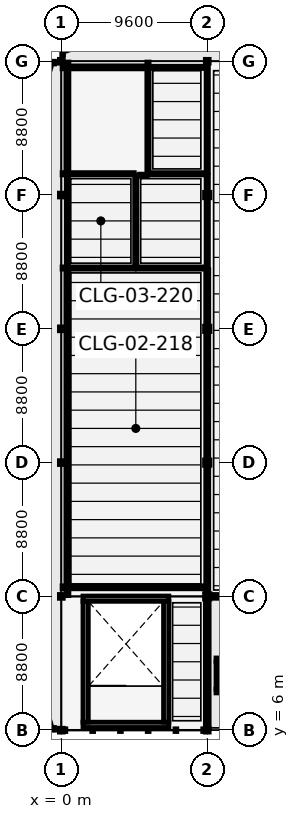
"""IFC4 building model, lengths in metres.
Left out: names, types, materials, properties, quantities, classifications, styles, units other than length and angle.
Written with IfcOpenShell. Run it as: python <this file> out.ifc"""

import sys

from ifc_helpers import new_model, si_unit, direction, frame, frame_2d, origin, origin_2d, place, context, subcontext, project, spatial, rectangle, hollow_rectangle, i_section, extrude, element, fill, save


model = new_model("IFC4")
c1 = context("Model", 3, precision=1e-05, world=origin(), true_north=direction((0.0, 1.0)))
c2 = subcontext(c1, "Body", "Model", "MODEL_VIEW")
j1 = project(units=[si_unit("LENGTHUNIT", "METRE"), si_unit("PLANEANGLEUNIT", "RADIAN")], contexts=[c1])
p1 = place(None, origin())
s1 = spatial("IfcSite", under=j1, at=p1, CompositionType="ELEMENT")
p2 = place(p1, origin())
s2 = spatial("IfcBuilding", under=s1, at=p2, CompositionType="ELEMENT")
p3 = place(p2, frame((0.0, 0.0, 9.6)))
s3 = spatial("IfcBuildingStorey", under=s2, at=p3, CompositionType="ELEMENT", Elevation=9.6)
p4 = place(p3, frame((0.0, 6.0, 0.0), z_axis=(0.0, 0.0, 1.0), x_axis=(1.0, 0.0, 0.0)))
e1 = element("IfcColumn", 1, at=p4, inside=s3, PredefinedType="COLUMN", context=c2, shape_type="SweptSolid", body=[
    extrude(hollow_rectangle(XDim=0.254, YDim=0.254, WallThickness=0.012, at=origin_2d()), origin(), (0.0, 0.0, 1.0), 4.046),
])
p5 = place(p3, frame((0.0, 14.8, 0.0), z_axis=(0.0, 0.0, 1.0), x_axis=(1.0, 0.0, 0.0)))
e2 = element("IfcColumn", 2, at=p5, inside=s3, PredefinedType="COLUMN", context=c2, shape_type="SweptSolid", body=[
    extrude(hollow_rectangle(XDim=0.254, YDim=0.254, WallThickness=0.012, at=origin_2d()), origin(), (0.0, 0.0, 1.0), 4.397),
])
p6 = place(p3, frame((0.0, 23.6, 0.0), z_axis=(0.0, 0.0, 1.0), x_axis=(1.0, 0.0, 0.0)))
e3 = element("IfcColumn", 3, at=p6, inside=s3, PredefinedType="COLUMN", context=c2, shape_type="SweptSolid", body=[
    extrude(hollow_rectangle(XDim=0.254, YDim=0.254, WallThickness=0.012, at=origin_2d()), origin(), (0.0, 0.0, 1.0), 4.601),
])
p7 = place(p3, frame((0.0, 32.4, 0.0), z_axis=(0.0, 0.0, 1.0), x_axis=(1.0, 0.0, 0.0)))
e4 = element("IfcColumn", 4, at=p7, inside=s3, PredefinedType="COLUMN", context=c2, shape_type="SweptSolid", body=[
    extrude(hollow_rectangle(XDim=0.254, YDim=0.254, WallThickness=0.012, at=origin_2d()), origin(), (0.0, 0.0, 1.0), 4.604),
])
p8 = place(p3, frame((0.0, 41.2, 0.0), z_axis=(0.0, 0.0, 1.0), x_axis=(1.0, 0.0, 0.0)))
e5 = element("IfcColumn", 5, at=p8, inside=s3, PredefinedType="COLUMN", context=c2, shape_type="SweptSolid", body=[
    extrude(hollow_rectangle(XDim=0.254, YDim=0.254, WallThickness=0.012, at=origin_2d()), origin(), (0.0, 0.0, 1.0), 4.403),
])
p9 = place(p3, frame((0.0, 50.0, 0.0), z_axis=(0.0, 0.0, 1.0), x_axis=(1.0, 0.0, 0.0)))
e6 = element("IfcColumn", 6, at=p9, inside=s3, PredefinedType="COLUMN", context=c2, shape_type="SweptSolid", body=[
    extrude(hollow_rectangle(XDim=0.254, YDim=0.254, WallThickness=0.012, at=origin_2d()), origin(), (0.0, 0.0, 1.0), 4.055),
])
p10 = place(p3, frame((9.6, 6.0, 0.0), z_axis=(0.0, 0.0, 1.0), x_axis=(1.0, 0.0, 0.0)))
e7 = element("IfcColumn", 7, at=p10, inside=s3, PredefinedType="COLUMN", context=c2, shape_type="SweptSolid", body=[
    extrude(hollow_rectangle(XDim=0.254, YDim=0.254, WallThickness=0.012, at=origin_2d()), origin(), (0.0, 0.0, 1.0), 4.622),
])
p11 = place(p3, frame((9.6, 14.8, 0.0), z_axis=(0.0, 0.0, 1.0), x_axis=(1.0, 0.0, 0.0)))
e8 = element("IfcColumn", 8, at=p11, inside=s3, PredefinedType="COLUMN", context=c2, shape_type="SweptSolid", body=[
    extrude(i_section(OverallWidth=0.356, OverallDepth=0.356, WebThickness=0.011, FlangeThickness=0.018, FilletRadius=0.025, at=origin_2d()), origin(), (0.0, 0.0, 1.0), 5.629),
])
p12 = place(p3, frame((9.6, 23.6, 0.0), z_axis=(0.0, 0.0, 1.0), x_axis=(1.0, 0.0, 0.0)))
e9 = element("IfcColumn", 9, at=p12, inside=s3, PredefinedType="COLUMN", context=c2, shape_type="SweptSolid", body=[
    extrude(i_section(OverallWidth=0.356, OverallDepth=0.356, WebThickness=0.011, FlangeThickness=0.018, FilletRadius=0.025, at=origin_2d()), origin(), (0.0, 0.0, 1.0), 6.217),
])
p13 = place(p3, frame((9.6, 32.4, 0.0), z_axis=(0.0, 0.0, 1.0), x_axis=(1.0, 0.0, 0.0)))
e10 = element("IfcColumn", 10, at=p13, inside=s3, PredefinedType="COLUMN", context=c2, shape_type="SweptSolid", body=[
    extrude(i_section(OverallWidth=0.356, OverallDepth=0.356, WebThickness=0.011, FlangeThickness=0.018, FilletRadius=0.025, at=origin_2d()), origin(), (0.0, 0.0, 1.0), 6.224),
])
p14 = place(p3, frame((9.6, 41.2, 0.0), z_axis=(0.0, 0.0, 1.0), x_axis=(1.0, 0.0, 0.0)))
e11 = element("IfcColumn", 11, at=p14, inside=s3, PredefinedType="COLUMN", context=c2, shape_type="SweptSolid", body=[
    extrude(i_section(OverallWidth=0.356, OverallDepth=0.356, WebThickness=0.011, FlangeThickness=0.018, FilletRadius=0.025, at=origin_2d()), origin(), (0.0, 0.0, 1.0), 5.648),
])
p15 = place(p3, frame((9.6, 50.0, 0.0), z_axis=(0.0, 0.0, 1.0), x_axis=(1.0, 0.0, 0.0)))
e12 = element("IfcColumn", 12, at=p15, inside=s3, PredefinedType="COLUMN", context=c2, shape_type="SweptSolid", body=[
    extrude(hollow_rectangle(XDim=0.254, YDim=0.254, WallThickness=0.012, at=origin_2d()), origin(), (0.0, 0.0, 1.0), 4.648),
])
p16 = place(p3, frame((9.6, 14.8, 0.0), z_axis=(0.0, 0.0, 1.0), x_axis=(1.0, 0.0, 0.0)))
e13 = element("IfcWall", 13, at=p16, inside=s3, PredefinedType="STANDARD", context=c2, shape_type="SweptSolid", body=[
    extrude(rectangle(XDim=9.6, YDim=0.25, at=frame_2d((4.8, 0.0))), origin(), (0.0, 0.0, 1.0), 3.5),
])
p17 = place(p16, frame((3.6, 0.0, 0.0)))
e14 = element("IfcOpeningElement", 14, at=p17, cuts=e13, PredefinedType="OPENING", context=c2, shape_type="SweptSolid", body=[
    extrude(rectangle(XDim=1.48, YDim=2.11, at=frame_2d((0.74, 1.055))), frame((0.0, 0.135, 0.0), z_axis=(0.0, -1.0, 0.0), x_axis=(1.0, 0.0, 0.0)), (0.0, 0.0, 1.0), 0.27),
])
p18 = place(p16, frame((1.1, 0.0, 0.85)))
e15 = element("IfcOpeningElement", 15, at=p18, cuts=e13, PredefinedType="OPENING", context=c2, shape_type="SweptSolid", body=[
    extrude(rectangle(XDim=1.68, YDim=1.71, at=frame_2d((0.84, 0.855))), frame((0.0, 0.135, 0.0), z_axis=(0.0, -1.0, 0.0), x_axis=(1.0, 0.0, 0.0)), (0.0, 0.0, 1.0), 0.27),
])
p19 = place(p3, frame((9.6, 6.127, 0.0), z_axis=(0.0, 0.0, 1.0), x_axis=(0.0, 1.0, 0.0)))
e16 = element("IfcWall", 16, at=p19, inside=s3, PredefinedType="STANDARD", context=c2, shape_type="SweptSolid", body=[
    extrude(rectangle(XDim=8.495, YDim=0.25, at=frame_2d((4.248, 0.0))), origin(), (0.0, 0.0, 1.0), 3.5),
])
p20 = place(p19, frame((3.4, 0.0, 0.0)))
e17 = element("IfcOpeningElement", 17, at=p20, cuts=e16, PredefinedType="OPENING", context=c2, shape_type="SweptSolid", body=[
    extrude(rectangle(XDim=1.0, YDim=2.2, at=frame_2d((0.5, 1.1))), frame((0.0, 0.135, 0.0), z_axis=(0.0, -1.0, 0.0), x_axis=(1.0, 0.0, 0.0)), (0.0, 0.0, 1.0), 0.27),
])
for number, where, z_axis, x_axis in (
    (18, (7.075, 6.35, 0.0), (0.0, 0.0, 1.0), (-1.0, 0.0, 0.0)),
    (19, (1.425, 14.65, 0.0), (0.0, 0.0, 1.0), (1.0, 0.0, 0.0)),
):
    element("IfcWall", number, at=place(p3, frame(where, z_axis=z_axis, x_axis=x_axis)), inside=s3, PredefinedType="SHEAR", context=c2, shape_type="SweptSolid", body=[
        extrude(rectangle(XDim=5.65, YDim=0.35, at=frame_2d((2.825, 0.0))), origin(), (0.0, 0.0, 1.0), 3.85),
    ])
p21 = place(p3, frame((1.6, 6.525, 0.0), z_axis=(0.0, 0.0, 1.0), x_axis=(0.0, 1.0, 0.0)))
e20 = element("IfcWall", 20, at=p21, inside=s3, PredefinedType="SHEAR", context=c2, shape_type="SweptSolid", body=[
    extrude(rectangle(XDim=7.95, YDim=0.35, at=frame_2d((3.975, 0.0))), origin(), (0.0, 0.0, 1.0), 3.85),
])
p22 = place(p3, frame((6.9, 14.475, 0.0), z_axis=(0.0, 0.0, 1.0), x_axis=(0.0, -1.0, 0.0)))
e21 = element("IfcWall", 21, at=p22, inside=s3, PredefinedType="SHEAR", context=c2, shape_type="SweptSolid", body=[
    extrude(rectangle(XDim=7.95, YDim=0.35, at=frame_2d((3.975, 0.0))), origin(), (0.0, 0.0, 1.0), 3.85),
])
p23 = place(p22, frame((5.68, 0.0, 0.0)))
e22 = element("IfcOpeningElement", 22, at=p23, cuts=e21, PredefinedType="OPENING", context=c2, shape_type="SweptSolid", body=[
    extrude(rectangle(XDim=2.05, YDim=2.15, at=frame_2d((1.025, 1.075))), frame((0.0, 0.185, 0.0), z_axis=(0.0, -1.0, 0.0), x_axis=(1.0, 0.0, 0.0)), (0.0, 0.0, 1.0), 0.37),
])
p24 = place(p3, frame((13.025, 8.575, 0.0), z_axis=(0.0, 0.0, 1.0), x_axis=(-1.0, 0.0, 0.0)))
e23 = element("IfcWall", 23, at=p24, inside=s3, PredefinedType="SOLIDWALL", context=c2, shape_type="SweptSolid", body=[
    extrude(rectangle(XDim=2.85, YDim=0.25, at=frame_2d((1.425, 0.0))), origin(), (0.0, 0.0, 1.0), 3.55),
])
p25 = place(p3, frame((10.175, 10.625, 0.0), z_axis=(0.0, 0.0, 1.0), x_axis=(1.0, 0.0, 0.0)))
e24 = element("IfcWall", 24, at=p25, inside=s3, PredefinedType="SOLIDWALL", context=c2, shape_type="SweptSolid", body=[
    extrude(rectangle(XDim=2.85, YDim=0.25, at=frame_2d((1.425, 0.0))), origin(), (0.0, 0.0, 1.0), 3.55),
])
p26 = place(p25, frame((0.875, 0.0, 0.0)))
e25 = element("IfcOpeningElement", 25, at=p26, cuts=e24, PredefinedType="OPENING", context=c2, shape_type="SweptSolid", body=[
    extrude(rectangle(XDim=1.1, YDim=2.15, at=frame_2d((0.55, 1.075))), frame((0.0, 0.135, 0.0), z_axis=(0.0, -1.0, 0.0), x_axis=(1.0, 0.0, 0.0)), (0.0, 0.0, 1.0), 0.27),
])
p27 = place(p3, frame((10.3, 8.7, 0.0), z_axis=(0.0, 0.0, 1.0), x_axis=(0.0, 1.0, 0.0)))
e26 = element("IfcWall", 26, at=p27, inside=s3, PredefinedType="SOLIDWALL", context=c2, shape_type="SweptSolid", body=[
    extrude(rectangle(XDim=1.8, YDim=0.25, at=frame_2d((0.9, 0.0))), origin(), (0.0, 0.0, 1.0), 3.55),
])
p28 = place(p3, frame((9.6, 14.85, 0.0), z_axis=(0.0, 0.0, 1.0), x_axis=(0.0, 1.0, 0.0)))
e27 = element("IfcWall", 27, at=p28, inside=s3, PredefinedType="PARTITIONING", context=c2, shape_type="SweptSolid", body=[
    extrude(rectangle(XDim=21.45, YDim=0.2, at=frame_2d((10.725, 0.0))), origin(), (0.0, 0.0, 1.0), 3.4),
])
p29 = place(p28, frame((9.925, 0.0, 0.0)))
e28 = element("IfcOpeningElement", 28, at=p29, cuts=e27, PredefinedType="OPENING", context=c2, shape_type="SweptSolid", body=[
    extrude(rectangle(XDim=1.6, YDim=2.15, at=frame_2d((0.8, 1.075))), frame((0.0, 0.11, 0.0), z_axis=(0.0, -1.0, 0.0), x_axis=(1.0, 0.0, 0.0)), (0.0, 0.0, 1.0), 0.22),
])
p30 = place(p3, frame((9.6, 36.5, 0.0), z_axis=(0.0, 0.0, 1.0), x_axis=(0.0, 1.0, 0.0)))
e29 = element("IfcWall", 29, at=p30, inside=s3, PredefinedType="PARTITIONING", context=c2, shape_type="SweptSolid", body=[
    extrude(rectangle(XDim=6.0, YDim=0.15, at=frame_2d((3.0, 0.0))), origin(), (0.0, 0.0, 1.0), 3.4),
])
p31 = place(p30, frame((2.55, 0.0, 0.0)))
e30 = element("IfcOpeningElement", 30, at=p31, cuts=e29, PredefinedType="OPENING", context=c2, shape_type="SweptSolid", body=[
    extrude(rectangle(XDim=0.9, YDim=2.15, at=frame_2d((0.45, 1.075))), frame((0.0, 0.085, 0.0), z_axis=(0.0, -1.0, 0.0), x_axis=(1.0, 0.0, 0.0)), (0.0, 0.0, 1.0), 0.17),
])
p32 = place(p3, frame((9.6, 42.7, 0.0), z_axis=(0.0, 0.0, 1.0), x_axis=(0.0, 1.0, 0.0)))
e31 = element("IfcWall", 31, at=p32, inside=s3, PredefinedType="PARTITIONING", context=c2, shape_type="SweptSolid", body=[
    extrude(rectangle(XDim=7.25, YDim=0.15, at=frame_2d((3.625, 0.0))), origin(), (0.0, 0.0, 1.0), 3.4),
])
p33 = place(p32, frame((3.15, 0.0, 0.0)))
e32 = element("IfcOpeningElement", 32, at=p33, cuts=e31, PredefinedType="OPENING", context=c2, shape_type="SweptSolid", body=[
    extrude(rectangle(XDim=0.95, YDim=2.15, at=frame_2d((0.475, 1.075))), frame((0.0, 0.085, 0.0), z_axis=(0.0, -1.0, 0.0), x_axis=(1.0, 0.0, 0.0)), (0.0, 0.0, 1.0), 0.17),
])
p34 = place(p3, frame((0.05, 36.4, 0.0), z_axis=(0.0, 0.0, 1.0), x_axis=(1.0, 0.0, 0.0)))
e33 = element("IfcWall", 33, at=p34, inside=s3, PredefinedType="PARTITIONING", context=c2, shape_type="SweptSolid", body=[
    extrude(rectangle(XDim=4.75, YDim=0.15, at=frame_2d((2.375, 0.0))), origin(), (0.0, 0.0, 1.0), 3.4),
])
p35 = place(p3, frame((5.0, 36.4, 0.0), z_axis=(0.0, 0.0, 1.0), x_axis=(1.0, 0.0, 0.0)))
e34 = element("IfcWall", 34, at=p35, inside=s3, PredefinedType="PARTITIONING", context=c2, shape_type="SweptSolid", body=[
    extrude(rectangle(XDim=4.4, YDim=0.15, at=frame_2d((2.2, 0.0))), origin(), (0.0, 0.0, 1.0), 3.4),
])
p36 = place(p3, frame((4.9, 36.5, 0.0), z_axis=(0.0, 0.0, 1.0), x_axis=(0.0, 1.0, 0.0)))
e35 = element("IfcWall", 35, at=p36, inside=s3, PredefinedType="PARTITIONING", context=c2, shape_type="SweptSolid", body=[
    extrude(rectangle(XDim=6.0, YDim=0.15, at=frame_2d((3.0, 0.0))), origin(), (0.0, 0.0, 1.0), 3.4),
])
p37 = place(p3, frame((0.05, 42.6, 0.0), z_axis=(0.0, 0.0, 1.0), x_axis=(1.0, 0.0, 0.0)))
e36 = element("IfcWall", 36, at=p37, inside=s3, PredefinedType="PARTITIONING", context=c2, shape_type="SweptSolid", body=[
    extrude(rectangle(XDim=4.75, YDim=0.15, at=frame_2d((2.375, 0.0))), origin(), (0.0, 0.0, 1.0), 3.4),
])
p38 = place(p3, frame((5.8, 42.6, 0.0), z_axis=(0.0, 0.0, 1.0), x_axis=(1.0, 0.0, 0.0)))
e37 = element("IfcWall", 37, at=p38, inside=s3, PredefinedType="PARTITIONING", context=c2, shape_type="SweptSolid", body=[
    extrude(rectangle(XDim=3.6, YDim=0.15, at=frame_2d((1.8, 0.0))), origin(), (0.0, 0.0, 1.0), 3.4),
])
p39 = place(p3, frame((5.7, 42.7, 0.0), z_axis=(0.0, 0.0, 1.0), x_axis=(0.0, 1.0, 0.0)))
e38 = element("IfcWall", 38, at=p39, inside=s3, PredefinedType="PARTITIONING", context=c2, shape_type="SweptSolid", body=[
    extrude(rectangle(XDim=7.25, YDim=0.15, at=frame_2d((3.625, 0.0))), origin(), (0.0, 0.0, 1.0), 3.4),
])
p40 = place(p3, frame((0.05, 15.4, 0.0), z_axis=(0.0, 0.0, 1.0), x_axis=(1.0, 0.0, 0.0)))
e39 = element("IfcWall", 39, at=p40, inside=s3, PredefinedType="PARTITIONING", context=c2, shape_type="SweptSolid", body=[
    extrude(rectangle(XDim=9.21, YDim=0.2, at=frame_2d((4.605, 0.0))), origin(), (0.0, 0.0, 1.0), 3.4),
])
p41 = place(p3, frame((0.4, 14.85, 0.0), z_axis=(0.0, 0.0, 1.0), x_axis=(0.0, 1.0, 0.0)))
e40 = element("IfcWall", 40, at=p41, inside=s3, PredefinedType="PARTITIONING", context=c2, shape_type="SweptSolid", body=[
    extrude(rectangle(XDim=21.31, YDim=0.2, at=frame_2d((10.655, 0.0))), origin(), (0.0, 0.0, 1.0), 3.4),
])
p42 = place(p3, frame((0.4, 36.64, 0.0), z_axis=(0.0, 0.0, 1.0), x_axis=(0.0, 1.0, 0.0)))
e41 = element("IfcWall", 41, at=p42, inside=s3, PredefinedType="PARTITIONING", context=c2, shape_type="SweptSolid", body=[
    extrude(rectangle(XDim=5.72, YDim=0.15, at=frame_2d((2.86, 0.0))), origin(), (0.0, 0.0, 1.0), 3.4),
])
p43 = place(p42, frame((2.41, 0.0, 0.0)))
e42 = element("IfcOpeningElement", 42, at=p43, cuts=e41, PredefinedType="OPENING", context=c2, shape_type="SweptSolid", body=[
    extrude(rectangle(XDim=0.9, YDim=2.15, at=frame_2d((0.45, 1.075))), frame((0.0, 0.085, 0.0), z_axis=(0.0, -1.0, 0.0), x_axis=(1.0, 0.0, 0.0)), (0.0, 0.0, 1.0), 0.17),
])
p44 = place(p3, frame((5.14, 42.5, 0.0), z_axis=(0.0, 0.0, 1.0), x_axis=(1.0, 0.0, 0.0)))
e43 = element("IfcWall", 43, at=p44, inside=s3, PredefinedType="PARTITIONING", context=c2, shape_type="SweptSolid", body=[
    extrude(rectangle(XDim=0.52, YDim=0.15, at=frame_2d((0.26, 0.0))), origin(), (0.0, 0.0, 1.0), 3.4),
])
p45 = place(p3, frame((5.94, 49.6, 0.0), z_axis=(0.0, 0.0, 1.0), x_axis=(1.0, 0.0, 0.0)))
e44 = element("IfcWall", 44, at=p45, inside=s3, PredefinedType="PARTITIONING", context=c2, shape_type="SweptSolid", body=[
    extrude(rectangle(XDim=3.32, YDim=0.15, at=frame_2d((1.66, 0.0))), origin(), (0.0, 0.0, 1.0), 3.4),
])
p46 = place(p3, frame((0.05, 49.6, 0.0), z_axis=(0.0, 0.0, 1.0), x_axis=(1.0, 0.0, 0.0)))
e45 = element("IfcWall", 45, at=p46, inside=s3, PredefinedType="PARTITIONING", context=c2, shape_type="SweptSolid", body=[
    extrude(rectangle(XDim=5.41, YDim=0.2, at=frame_2d((2.705, 0.0))), origin(), (0.0, 0.0, 1.0), 3.4),
])
p47 = place(p46, frame((2.205, 0.0, 0.0)))
e46 = element("IfcOpeningElement", 46, at=p47, cuts=e45, PredefinedType="OPENING", context=c2, shape_type="SweptSolid", body=[
    extrude(rectangle(XDim=1.0, YDim=2.15, at=frame_2d((0.5, 1.075))), frame((0.0, 0.11, 0.0), z_axis=(0.0, -1.0, 0.0), x_axis=(1.0, 0.0, 0.0)), (0.0, 0.0, 1.0), 0.22),
])
p48 = place(p3, frame((0.4, 42.84, 0.0), z_axis=(0.0, 0.0, 1.0), x_axis=(0.0, 1.0, 0.0)))
e47 = element("IfcWall", 47, at=p48, inside=s3, PredefinedType="PARTITIONING", context=c2, shape_type="SweptSolid", body=[
    extrude(rectangle(XDim=7.11, YDim=0.2, at=frame_2d((3.555, 0.0))), origin(), (0.0, 0.0, 1.0), 3.4),
])
p49 = place(p20, origin())
e48 = element("IfcDoor", 48, at=p49, inside=s3, OperationType="SINGLE_SWING_LEFT", PredefinedType="DOOR", context=c2, shape_type="SweptSolid", body=[
    extrude(rectangle(XDim=1.0, YDim=2.2, at=frame_2d((0.5, 1.1))), frame((0.0, 0.025, 0.0), z_axis=(0.0, -1.0, 0.0), x_axis=(1.0, 0.0, 0.0)), (0.0, 0.0, 1.0), 0.05),
])
fill(e17, e48)
p50 = place(p23, origin())
e49 = element("IfcDoor", 49, at=p50, inside=s3, OperationType="DOUBLE_DOOR_SINGLE_SWING", PredefinedType="DOOR", context=c2, shape_type="SweptSolid", body=[
    extrude(rectangle(XDim=2.05, YDim=2.15, at=frame_2d((1.025, 1.075))), frame((0.0, 0.025, 0.0), z_axis=(0.0, -1.0, 0.0), x_axis=(1.0, 0.0, 0.0)), (0.0, 0.0, 1.0), 0.05),
])
fill(e22, e49)
p51 = place(p29, origin())
e50 = element("IfcDoor", 50, at=p51, inside=s3, OperationType="DOUBLE_DOOR_SINGLE_SWING", PredefinedType="DOOR", context=c2, shape_type="SweptSolid", body=[
    extrude(rectangle(XDim=1.6, YDim=2.15, at=frame_2d((0.8, 1.075))), frame((0.0, 0.025, 0.0), z_axis=(0.0, -1.0, 0.0), x_axis=(1.0, 0.0, 0.0)), (0.0, 0.0, 1.0), 0.05),
])
fill(e28, e50)
p52 = place(p31, origin())
e51 = element("IfcDoor", 51, at=p52, inside=s3, OperationType="SINGLE_SWING_LEFT", PredefinedType="DOOR", context=c2, shape_type="SweptSolid", body=[
    extrude(rectangle(XDim=0.9, YDim=2.15, at=frame_2d((0.45, 1.075))), frame((0.0, 0.025, 0.0), z_axis=(0.0, -1.0, 0.0), x_axis=(1.0, 0.0, 0.0)), (0.0, 0.0, 1.0), 0.05),
])
fill(e30, e51)
p53 = place(p33, origin())
e52 = element("IfcDoor", 52, at=p53, inside=s3, OperationType="SINGLE_SWING_RIGHT", PredefinedType="DOOR", context=c2, shape_type="SweptSolid", body=[
    extrude(rectangle(XDim=0.95, YDim=2.15, at=frame_2d((0.475, 1.075))), frame((0.0, 0.025, 0.0), z_axis=(0.0, -1.0, 0.0), x_axis=(1.0, 0.0, 0.0)), (0.0, 0.0, 1.0), 0.05),
])
fill(e32, e52)
p54 = place(p43, origin())
e53 = element("IfcDoor", 53, at=p54, inside=s3, OperationType="SINGLE_SWING_RIGHT", PredefinedType="DOOR", context=c2, shape_type="SweptSolid", body=[
    extrude(rectangle(XDim=0.9, YDim=2.15, at=frame_2d((0.45, 1.075))), frame((0.0, 0.025, 0.0), z_axis=(0.0, -1.0, 0.0), x_axis=(1.0, 0.0, 0.0)), (0.0, 0.0, 1.0), 0.05),
])
fill(e42, e53)
p55 = place(p47, origin())
e54 = element("IfcDoor", 54, at=p55, inside=s3, OperationType="SINGLE_SWING_LEFT", PredefinedType="DOOR", context=c2, shape_type="SweptSolid", body=[
    extrude(rectangle(XDim=1.0, YDim=2.15, at=frame_2d((0.5, 1.075))), frame((0.0, 0.025, 0.0), z_axis=(0.0, -1.0, 0.0), x_axis=(1.0, 0.0, 0.0)), (0.0, 0.0, 1.0), 0.05),
])
fill(e46, e54)
save(model, sys.argv[1])
